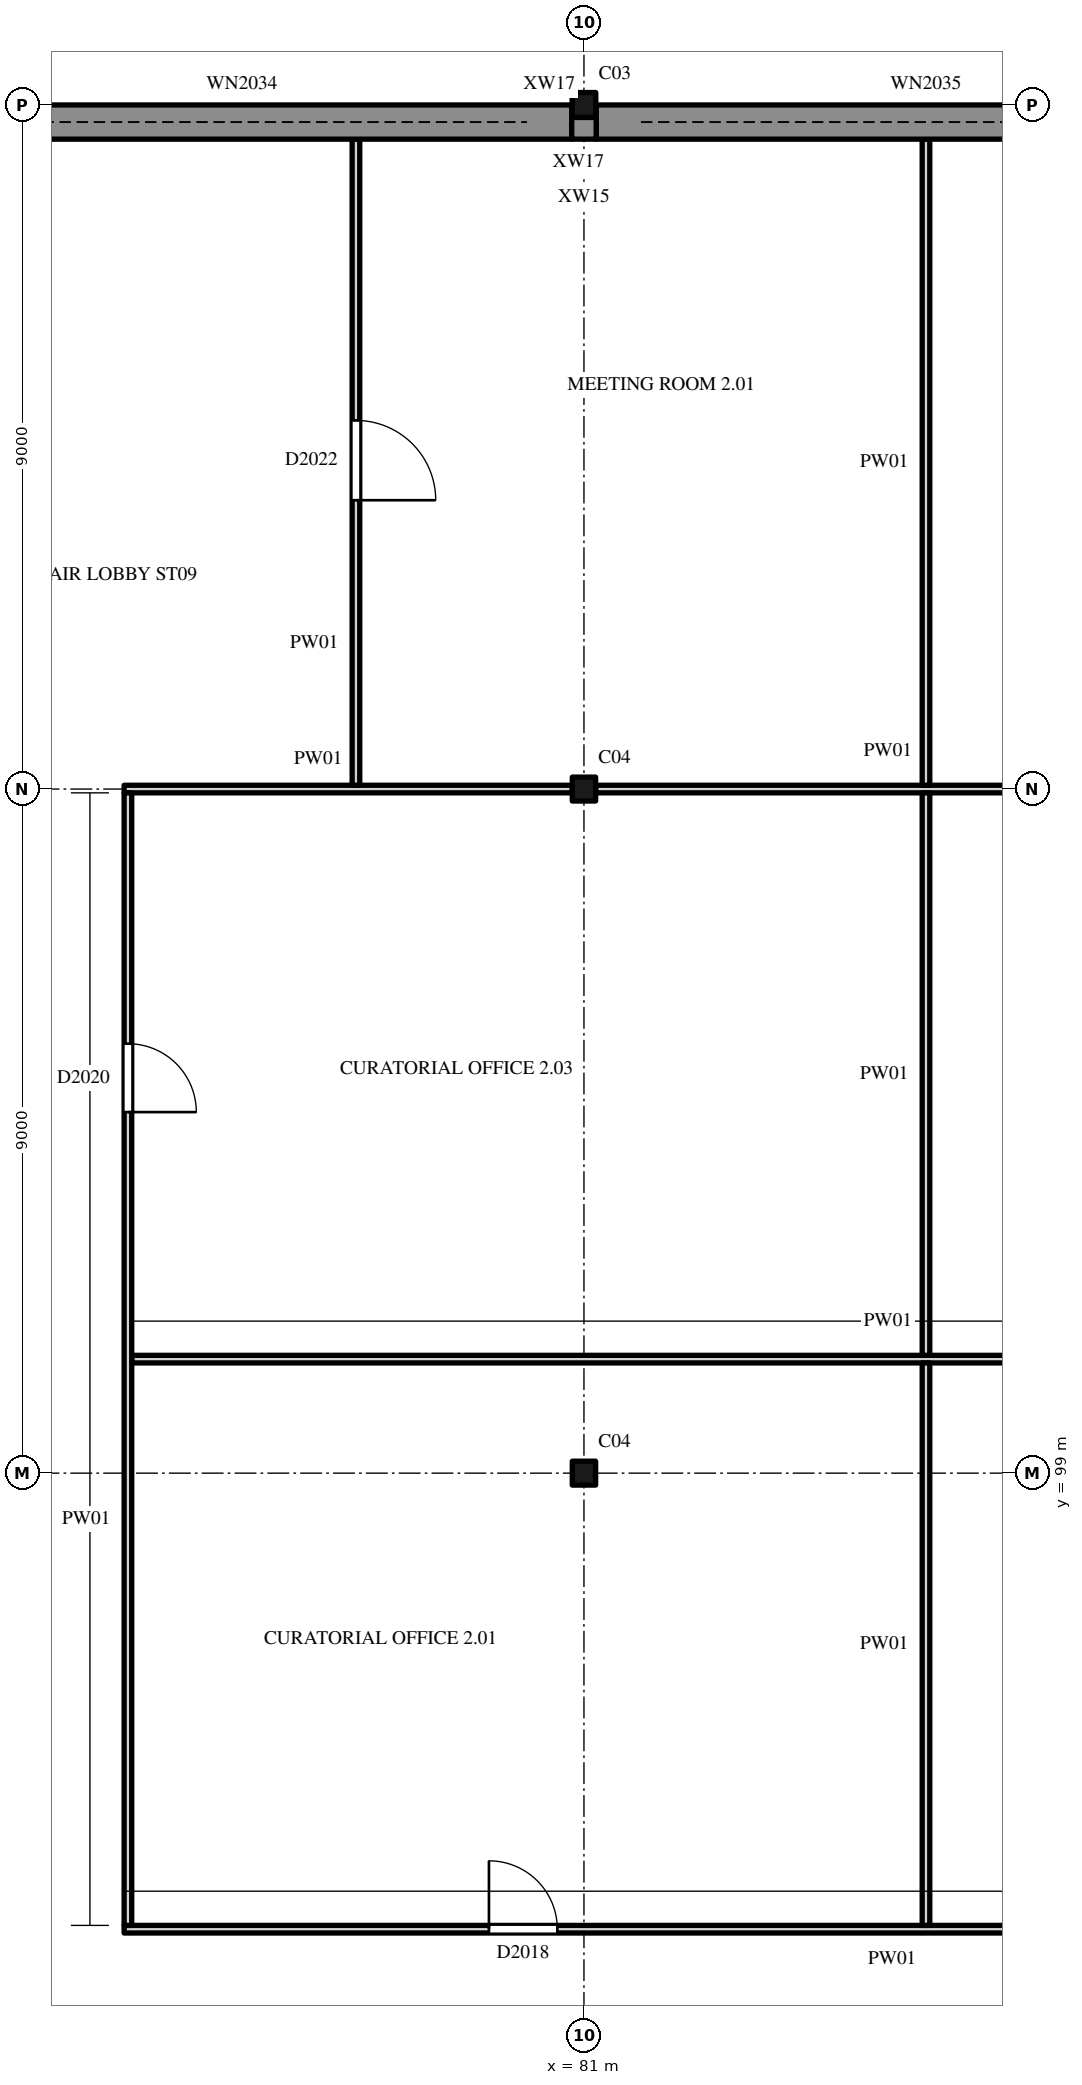
"""IFC4 building model, lengths in metres.
Left out: names, types, materials, properties, quantities, classifications, styles, units other than length and angle.
Written with IfcOpenShell. Run it as: python <this file> out.ifc"""

import sys

from ifc_helpers import new_model, si_unit, direction, frame, frame_2d, origin, origin_2d, place, context, subcontext, project, spatial, rectangle, i_section, extrude, element, fill, save


model = new_model("IFC4")
c1 = context("Model", 3, precision=1e-05, world=origin(), true_north=direction((0.0, 1.0)))
c2 = subcontext(c1, "Body", "Model", "MODEL_VIEW")
j1 = project(units=[si_unit("LENGTHUNIT", "METRE"), si_unit("PLANEANGLEUNIT", "RADIAN")], contexts=[c1])
p1 = place(None, origin())
s1 = spatial("IfcSite", under=j1, at=p1, CompositionType="ELEMENT")
p2 = place(p1, origin())
s2 = spatial("IfcBuilding", under=s1, at=p2, CompositionType="ELEMENT")
p3 = place(p2, frame((0.0, 0.0, 11.0)))
s3 = spatial("IfcBuildingStorey", under=s2, at=p3, CompositionType="ELEMENT", Elevation=11.0)
for number, where, z_axis, x_axis in (
    (1, (81.0, 99.0, 0.0), (0.0, 0.0, 1.0), (1.0, 0.0, 0.0)),
    (2, (81.0, 108.0, 0.0), (0.0, 0.0, 1.0), (1.0, 0.0, 0.0)),
):
    element("IfcColumn", number, at=place(p3, frame(where, z_axis=z_axis, x_axis=x_axis)), inside=s3, PredefinedType="COLUMN", context=c2, shape_type="SweptSolid", body=[
        extrude(i_section(OverallWidth=0.307, OverallDepth=0.315, WebThickness=0.012, FlangeThickness=0.019, FilletRadius=0.017, at=origin_2d()), origin(), (0.0, 0.0, 1.0), 5.0),
    ])
p4 = place(p3, frame((81.0, 117.0, 0.0), z_axis=(0.0, 0.0, 1.0), x_axis=(1.0, 0.0, 0.0)))
e3 = element("IfcColumn", 3, at=p4, inside=s3, PredefinedType="COLUMN", context=c2, shape_type="SweptSolid", body=[
    extrude(i_section(OverallWidth=0.311, OverallDepth=0.327, WebThickness=0.016, FlangeThickness=0.025, FilletRadius=0.017, at=origin_2d()), origin(), (0.0, 0.0, 1.0), 5.0),
])
p5 = place(p3, frame((72.167, 116.775, 0.0), z_axis=(0.0, 0.0, 1.0), x_axis=(1.0, 0.0, 0.0)))
e4 = element("IfcWall", 4, at=p5, inside=s3, PredefinedType="SOLIDWALL", context=c2, shape_type="SweptSolid", body=[
    extrude(rectangle(XDim=8.673, YDim=0.45, at=frame_2d((4.336, 0.0))), origin(), (0.0, 0.0, 1.0), 4.469),
])
p6 = place(p5, frame((0.583, 0.0, 1.6)))
e5 = element("IfcOpeningElement", 5, at=p6, cuts=e4, PredefinedType="OPENING", context=c2, shape_type="SweptSolid", body=[
    extrude(rectangle(XDim=7.5, YDim=1.2, at=frame_2d((3.75, 0.6))), frame((0.0, 0.235, 0.0), z_axis=(0.0, -1.0, 0.0), x_axis=(1.0, 0.0, 0.0)), (0.0, 0.0, 1.0), 0.47),
])
p7 = place(p3, frame((81.161, 116.775, 0.0), z_axis=(0.0, 0.0, 1.0), x_axis=(1.0, 0.0, 0.0)))
e6 = element("IfcWall", 6, at=p7, inside=s3, PredefinedType="SOLIDWALL", context=c2, shape_type="SweptSolid", body=[
    extrude(rectangle(XDim=8.678, YDim=0.45, at=frame_2d((4.339, 0.0))), origin(), (0.0, 0.0, 1.0), 4.469),
])
p8 = place(p7, frame((0.589, 0.0, 1.6)))
e7 = element("IfcOpeningElement", 7, at=p8, cuts=e6, PredefinedType="OPENING", context=c2, shape_type="SweptSolid", body=[
    extrude(rectangle(XDim=7.5, YDim=1.2, at=frame_2d((3.75, 0.6))), frame((0.0, 0.235, 0.0), z_axis=(0.0, -1.0, 0.0), x_axis=(1.0, 0.0, 0.0)), (0.0, 0.0, 1.0), 0.47),
])
p9 = place(p3, frame((80.839, 116.693, 0.0), z_axis=(0.0, 0.0, 1.0), x_axis=(1.0, 0.0, 0.0)))
e8 = element("IfcWall", 8, at=p9, inside=s3, PredefinedType="SOLIDWALL", context=c2, shape_type="SweptSolid", body=[
    extrude(rectangle(XDim=0.322, YDim=0.286, at=frame_2d((0.161, 0.0))), origin(), (0.0, 0.0, 1.0), 4.469),
])
p10 = place(p3, frame((74.95, 93.0, 0.0), z_axis=(0.0, 0.0, 1.0), x_axis=(1.0, 0.0, 0.0)))
e9 = element("IfcWall", 9, at=p10, inside=s3, PredefinedType="PARTITIONING", context=c2, shape_type="SweptSolid", body=[
    extrude(rectangle(XDim=21.1, YDim=0.1, at=frame_2d((10.55, 0.0))), origin(), (0.0, 0.0, 1.0), 4.469),
])
p11 = place(p10, frame((4.8, 0.0, 0.0)))
e10 = element("IfcOpeningElement", 10, at=p11, cuts=e9, PredefinedType="OPENING", context=c2, shape_type="SweptSolid", body=[
    extrude(rectangle(XDim=0.9, YDim=2.1, at=frame_2d((0.45, 1.05))), frame((0.0, 0.06, 0.0), z_axis=(0.0, -1.0, 0.0), x_axis=(1.0, 0.0, 0.0)), (0.0, 0.0, 1.0), 0.12),
])
p12 = place(p10, frame((15.3, 0.0, 0.0)))
e11 = element("IfcOpeningElement", 11, at=p12, cuts=e9, PredefinedType="OPENING", context=c2, shape_type="SweptSolid", body=[
    extrude(rectangle(XDim=0.9, YDim=2.1, at=frame_2d((0.45, 1.05))), frame((0.0, 0.06, 0.0), z_axis=(0.0, -1.0, 0.0), x_axis=(1.0, 0.0, 0.0)), (0.0, 0.0, 1.0), 0.12),
])
p13 = place(p3, frame((75.05, 100.5, 0.0), z_axis=(0.0, 0.0, 1.0), x_axis=(1.0, 0.0, 0.0)))
e12 = element("IfcWall", 12, at=p13, inside=s3, PredefinedType="PARTITIONING", context=c2, shape_type="SweptSolid", body=[
    extrude(rectangle(XDim=20.9, YDim=0.1, at=frame_2d((10.45, 0.0))), origin(), (0.0, 0.0, 1.0), 4.825),
])
p14 = place(p3, frame((74.95, 108.0, 0.0), z_axis=(0.0, 0.0, 1.0), x_axis=(1.0, 0.0, 0.0)))
e13 = element("IfcWall", 13, at=p14, inside=s3, PredefinedType="PARTITIONING", context=c2, shape_type="SweptSolid", body=[
    extrude(rectangle(XDim=5.896, YDim=0.1, at=frame_2d((2.948, 0.0))), origin(), (0.0, 0.0, 1.0), 4.469),
])
p15 = place(p3, frame((81.154, 108.0, 0.0), z_axis=(0.0, 0.0, 1.0), x_axis=(1.0, 0.0, 0.0)))
e14 = element("IfcWall", 14, at=p15, inside=s3, PredefinedType="PARTITIONING", context=c2, shape_type="SweptSolid", body=[
    extrude(rectangle(XDim=8.693, YDim=0.1, at=frame_2d((4.346, 0.0))), origin(), (0.0, 0.0, 1.0), 4.469),
])
p16 = place(p3, frame((75.0, 93.05, 0.0), z_axis=(0.0, 0.0, 1.0), x_axis=(0.0, 1.0, 0.0)))
e15 = element("IfcWall", 15, at=p16, inside=s3, PredefinedType="PARTITIONING", context=c2, shape_type="SweptSolid", body=[
    extrude(rectangle(XDim=14.9, YDim=0.1, at=frame_2d((7.45, 0.0))), origin(), (0.0, 0.0, 1.0), 4.825),
])
p17 = place(p16, frame((10.7, 0.0, 0.0)))
e16 = element("IfcOpeningElement", 16, at=p17, cuts=e15, PredefinedType="OPENING", context=c2, shape_type="SweptSolid", body=[
    extrude(rectangle(XDim=0.9, YDim=2.1, at=frame_2d((0.45, 1.05))), frame((0.0, 0.06, 0.0), z_axis=(0.0, -1.0, 0.0), x_axis=(1.0, 0.0, 0.0)), (0.0, 0.0, 1.0), 0.12),
])
p18 = place(p3, frame((78.0, 108.05, 0.0), z_axis=(0.0, 0.0, 1.0), x_axis=(0.0, 1.0, 0.0)))
e17 = element("IfcWall", 17, at=p18, inside=s3, PredefinedType="PARTITIONING", context=c2, shape_type="SweptSolid", body=[
    extrude(rectangle(XDim=8.5, YDim=0.1, at=frame_2d((4.25, 0.0))), origin(), (0.0, 0.0, 1.0), 4.825),
])
p19 = place(p18, frame((3.75, 0.0, 0.0)))
e18 = element("IfcOpeningElement", 18, at=p19, cuts=e17, PredefinedType="OPENING", context=c2, shape_type="SweptSolid", body=[
    extrude(rectangle(XDim=1.05, YDim=2.1, at=frame_2d((0.525, 1.05))), frame((0.0, 0.06, 0.0), z_axis=(0.0, -1.0, 0.0), x_axis=(1.0, 0.0, 0.0)), (0.0, 0.0, 1.0), 0.12),
])
for number, where, z_axis, x_axis in (
    (19, (85.5, 93.05, 0.0), (0.0, 0.0, 1.0), (0.0, 1.0, 0.0)),
    (20, (85.5, 100.55, 0.0), (0.0, 0.0, 1.0), (0.0, 1.0, 0.0)),
):
    element("IfcWall", number, at=place(p3, frame(where, z_axis=z_axis, x_axis=x_axis)), inside=s3, PredefinedType="PARTITIONING", context=c2, shape_type="SweptSolid", body=[
        extrude(rectangle(XDim=7.4, YDim=0.1, at=frame_2d((3.7, 0.0))), origin(), (0.0, 0.0, 1.0), 4.825),
    ])
p20 = place(p3, frame((85.5, 108.05, 0.0), z_axis=(0.0, 0.0, 1.0), x_axis=(0.0, 1.0, 0.0)))
e21 = element("IfcWall", 21, at=p20, inside=s3, PredefinedType="PARTITIONING", context=c2, shape_type="SweptSolid", body=[
    extrude(rectangle(XDim=8.5, YDim=0.1, at=frame_2d((4.25, 0.0))), origin(), (0.0, 0.0, 1.0), 4.825),
])
p21 = place(p6, origin())
e22 = element("IfcWindow", 22, at=p21, inside=s3, PartitioningType="SINGLE_PANEL", PredefinedType="WINDOW", context=c2, shape_type="SweptSolid", body=[
    extrude(rectangle(XDim=7.5, YDim=1.2, at=frame_2d((3.75, 0.6))), frame((0.0, 0.03, 0.0), z_axis=(0.0, -1.0, 0.0), x_axis=(1.0, 0.0, 0.0)), (0.0, 0.0, 1.0), 0.06),
])
fill(e5, e22)
p22 = place(p8, origin())
e23 = element("IfcWindow", 23, at=p22, inside=s3, PartitioningType="SINGLE_PANEL", PredefinedType="WINDOW", context=c2, shape_type="SweptSolid", body=[
    extrude(rectangle(XDim=7.5, YDim=1.2, at=frame_2d((3.75, 0.6))), frame((0.0, 0.03, 0.0), z_axis=(0.0, -1.0, 0.0), x_axis=(1.0, 0.0, 0.0)), (0.0, 0.0, 1.0), 0.06),
])
fill(e7, e23)
p23 = place(p11, origin())
e24 = element("IfcDoor", 24, at=p23, inside=s3, OperationType="SINGLE_SWING_RIGHT", PredefinedType="DOOR", context=c2, shape_type="SweptSolid", body=[
    extrude(rectangle(XDim=0.9, YDim=2.1, at=frame_2d((0.45, 1.05))), frame((0.0, 0.025, 0.0), z_axis=(0.0, -1.0, 0.0), x_axis=(1.0, 0.0, 0.0)), (0.0, 0.0, 1.0), 0.05),
])
fill(e10, e24)
p24 = place(p17, origin())
e25 = element("IfcDoor", 25, at=p24, inside=s3, OperationType="SINGLE_SWING_LEFT", PredefinedType="DOOR", context=c2, shape_type="SweptSolid", body=[
    extrude(rectangle(XDim=0.9, YDim=2.1, at=frame_2d((0.45, 1.05))), frame((0.0, 0.025, 0.0), z_axis=(0.0, -1.0, 0.0), x_axis=(1.0, 0.0, 0.0)), (0.0, 0.0, 1.0), 0.05),
])
fill(e16, e25)
p25 = place(p19, origin())
e26 = element("IfcDoor", 26, at=p25, inside=s3, OperationType="SINGLE_SWING_LEFT", PredefinedType="DOOR", context=c2, shape_type="SweptSolid", body=[
    extrude(rectangle(XDim=1.05, YDim=2.1, at=frame_2d((0.525, 1.05))), frame((0.0, 0.025, 0.0), z_axis=(0.0, -1.0, 0.0), x_axis=(1.0, 0.0, 0.0)), (0.0, 0.0, 1.0), 0.05),
])
fill(e18, e26)
save(model, sys.argv[1])
